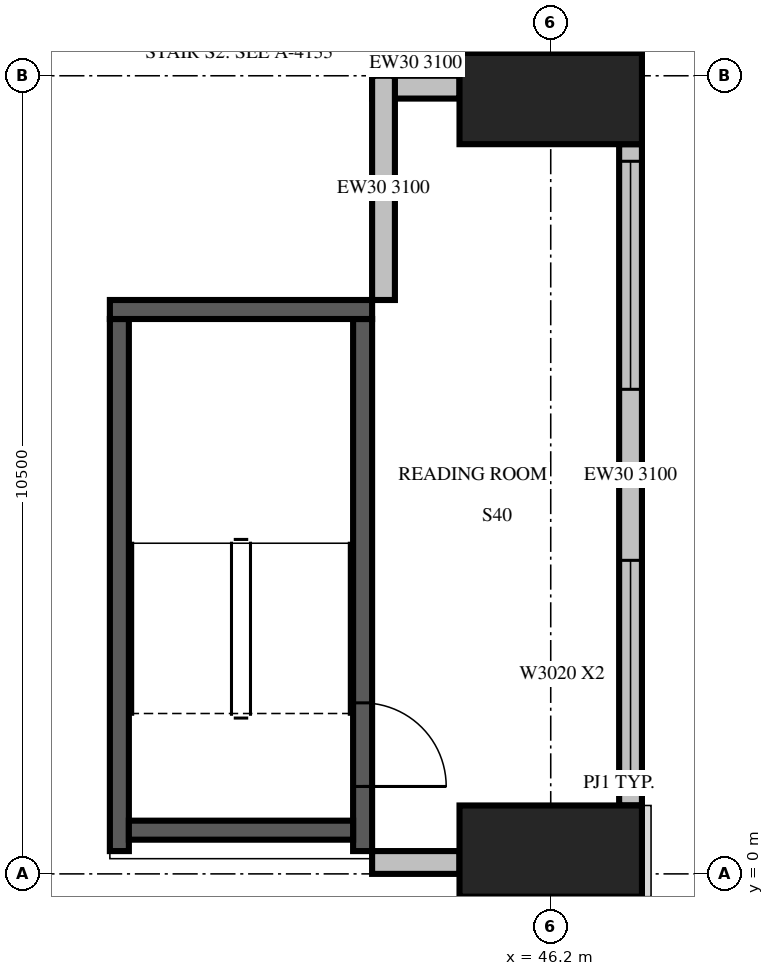
"""IFC4 building model, lengths in metres.
Left out: names, types, materials, properties, quantities, classifications, styles, units other than length and angle.
Written with IfcOpenShell. Run it as: python <this file> out.ifc"""

import sys

from ifc_helpers import new_model, si_unit, direction, frame, frame_2d, origin, origin_2d, place, context, subcontext, project, spatial, rectangle, extrude, source, transform, mapped, element, fill, save


model = new_model("IFC4")
c1 = context("Model", 3, precision=1e-05, world=origin(), true_north=direction((0.0, 1.0)))
c2 = subcontext(c1, "Body", "Model", "MODEL_VIEW")
j1 = project(units=[si_unit("LENGTHUNIT", "METRE"), si_unit("PLANEANGLEUNIT", "RADIAN")], contexts=[c1])
p1 = place(None, origin())
s1 = spatial("IfcSite", under=j1, at=p1, CompositionType="ELEMENT")
p2 = place(p1, origin())
s2 = spatial("IfcBuilding", under=s1, at=p2, CompositionType="ELEMENT")
p3 = place(p2, frame((0.0, 0.0, 337.0)))
s3 = spatial("IfcBuildingStorey", under=s2, at=p3, CompositionType="ELEMENT", Elevation=337.0)
m1 = source(origin(), c2, "Body", "SweptSolid", [
    extrude(rectangle(XDim=2.4, YDim=1.2, at=origin_2d()), origin(), (0.0, 0.0, 1.0), 3.5),
])
for number, where, z_axis, x_axis in (
    (1, (46.2, 0.3, 0.0), (0.0, 0.0, 1.0), (1.0, 0.0, 0.0)),
    (2, (46.2, 10.2, 0.0), (0.0, 0.0, 1.0), (1.0, 0.0, 0.0)),
):
    element("IfcColumn", number, at=place(p3, frame(where, z_axis=z_axis, x_axis=x_axis)), inside=s3, PredefinedType="PILASTER", context=c2, shape_type="MappedRepresentation", body=[
        mapped(m1, transform((0.0, 0.0, 0.0), scale=1.0)),
    ])
p4 = place(p3, frame((43.85, 0.15, 0.0), z_axis=(0.0, 0.0, 1.0), x_axis=(1.0, 0.0, 0.0)))
e3 = element("IfcWall", 3, at=p4, inside=s3, PredefinedType="STANDARD", context=c2, shape_type="SweptSolid", body=[
    extrude(rectangle(XDim=1.15, YDim=0.3, at=frame_2d((0.575, 0.0))), origin(), (0.0, 0.0, 1.0), 3.1),
])
m2 = source(origin(), c2, "Body", "SweptSolid", [
    extrude(rectangle(XDim=8.7, YDim=0.3, at=frame_2d((4.35, 0.0))), origin(), (0.0, 0.0, 1.0), 3.1),
])
p5 = place(p3, frame((47.25, 0.9, 0.0), z_axis=(0.0, 0.0, 1.0), x_axis=(0.0, 1.0, 0.0)))
e4 = element("IfcWall", 4, at=p5, inside=s3, PredefinedType="STANDARD", context=c2, shape_type="MappedRepresentation", body=[
    mapped(m2, transform((0.0, 0.0, 0.0), scale=1.0)),
])
m3 = source(origin(), c2, "Body", "SweptSolid", [
    extrude(rectangle(XDim=3.0, YDim=2.0, at=frame_2d((1.5, 1.0))), frame((0.0, 0.16, 0.0), z_axis=(0.0, -1.0, 0.0), x_axis=(1.0, 0.0, 0.0)), (0.0, 0.0, 1.0), 0.32),
])
p6 = place(p5, frame((0.225, 0.0, 0.6)))
e5 = element("IfcOpeningElement", 5, at=p6, cuts=e4, PredefinedType="OPENING", context=c2, shape_type="MappedRepresentation", body=[
    mapped(m3, transform((0.0, 0.0, 0.0), scale=1.0)),
])
p7 = place(p5, frame((5.475, 0.0, 0.6)))
e6 = element("IfcOpeningElement", 6, at=p7, cuts=e4, PredefinedType="OPENING", context=c2, shape_type="MappedRepresentation", body=[
    mapped(m3, transform((0.0, 0.0, 0.0), scale=1.0)),
])
m4 = source(origin(), c2, "Body", "SweptSolid", [
    extrude(rectangle(XDim=1.15, YDim=0.3, at=frame_2d((0.575, 0.0))), origin(), (0.0, 0.0, 1.0), 3.1),
])
p8 = place(p3, frame((45.0, 10.35, 0.0), z_axis=(0.0, 0.0, 1.0), x_axis=(-1.0, 0.0, 0.0)))
e7 = element("IfcWall", 7, at=p8, inside=s3, PredefinedType="STANDARD", context=c2, shape_type="MappedRepresentation", body=[
    mapped(m4, transform((0.0, 0.0, 0.0), scale=1.0)),
])
m5 = source(origin(), c2, "Body", "SweptSolid", [
    extrude(rectangle(XDim=2.95, YDim=0.3, at=frame_2d((1.475, 0.0))), origin(), (0.0, 0.0, 1.0), 3.1),
])
p9 = place(p3, frame((44.0, 10.5, 0.0), z_axis=(0.0, 0.0, 1.0), x_axis=(0.0, -1.0, 0.0)))
e8 = element("IfcWall", 8, at=p9, inside=s3, PredefinedType="STANDARD", context=c2, shape_type="MappedRepresentation", body=[
    mapped(m5, transform((0.0, 0.0, 0.0), scale=1.0)),
])
m6 = source(origin(), c2, "Body", "SweptSolid", [
    extrude(rectangle(XDim=7.0, YDim=0.25, at=frame_2d((3.5, 0.0))), origin(), (0.0, 0.0, 1.0), 3.1),
])
p10 = place(p3, frame((40.525, 0.3, 0.0), z_axis=(0.0, 0.0, 1.0), x_axis=(0.0, 1.0, 0.0)))
e9 = element("IfcWall", 9, at=p10, inside=s3, PredefinedType="SOLIDWALL", context=c2, shape_type="MappedRepresentation", body=[
    mapped(m6, transform((0.0, 0.0, 0.0), scale=1.0)),
])
p11 = place(p3, frame((43.725, 0.3, 0.0), z_axis=(0.0, 0.0, 1.0), x_axis=(0.0, 1.0, 0.0)))
e10 = element("IfcWall", 10, at=p11, inside=s3, PredefinedType="SOLIDWALL", context=c2, shape_type="MappedRepresentation", body=[
    mapped(m6, transform((0.0, 0.0, 0.0), scale=1.0)),
])
m7 = source(origin(), c2, "Body", "SweptSolid", [
    extrude(rectangle(XDim=1.1, YDim=2.1, at=frame_2d((0.55, 1.05))), frame((0.0, 0.135, 0.0), z_axis=(0.0, -1.0, 0.0), x_axis=(1.0, 0.0, 0.0)), (0.0, 0.0, 1.0), 0.27),
])
p12 = place(p11, frame((0.85, 0.0, 0.0)))
e11 = element("IfcOpeningElement", 11, at=p12, cuts=e10, PredefinedType="OPENING", context=c2, shape_type="MappedRepresentation", body=[
    mapped(m7, transform((0.0, 0.0, 0.0), scale=1.0)),
])
m8 = source(origin(), c2, "Body", "SweptSolid", [
    extrude(rectangle(XDim=3.45, YDim=0.25, at=frame_2d((1.725, 0.0))), origin(), (0.0, 0.0, 1.0), 3.1),
])
p13 = place(p3, frame((40.4, 7.425, 0.0), z_axis=(0.0, 0.0, 1.0), x_axis=(1.0, 0.0, 0.0)))
e12 = element("IfcWall", 12, at=p13, inside=s3, PredefinedType="SOLIDWALL", context=c2, shape_type="MappedRepresentation", body=[
    mapped(m8, transform((0.0, 0.0, 0.0), scale=1.0)),
])
m9 = source(origin(), c2, "Body", "SweptSolid", [
    extrude(rectangle(XDim=2.95, YDim=0.25, at=frame_2d((1.475, 0.0))), origin(), (0.0, 0.0, 1.0), 3.1),
])
p14 = place(p3, frame((40.65, 0.575, 0.0), z_axis=(0.0, 0.0, 1.0), x_axis=(1.0, 0.0, 0.0)))
e13 = element("IfcWall", 13, at=p14, inside=s3, PredefinedType="SOLIDWALL", context=c2, shape_type="MappedRepresentation", body=[
    mapped(m9, transform((0.0, 0.0, 0.0), scale=1.0)),
])
m10 = source(origin(), c2, "Body", "SweptSolid", [
    extrude(rectangle(XDim=3.0, YDim=2.0, at=frame_2d((1.5, 1.0))), frame((0.0, 0.03, 0.0), z_axis=(0.0, -1.0, 0.0), x_axis=(1.0, 0.0, 0.0)), (0.0, 0.0, 1.0), 0.06),
])
p15 = place(p6, origin())
e14 = element("IfcWindow", 14, at=p15, inside=s3, PartitioningType="SINGLE_PANEL", PredefinedType="WINDOW", context=c2, shape_type="MappedRepresentation", body=[
    mapped(m10, transform((0.0, 0.0, 0.0), scale=1.0)),
])
fill(e5, e14)
p16 = place(p7, origin())
e15 = element("IfcWindow", 15, at=p16, inside=s3, PartitioningType="SINGLE_PANEL", PredefinedType="WINDOW", context=c2, shape_type="MappedRepresentation", body=[
    mapped(m10, transform((0.0, 0.0, 0.0), scale=1.0)),
])
fill(e6, e15)
m11 = source(origin(), c2, "Body", "SweptSolid", [
    extrude(rectangle(XDim=1.1, YDim=2.1, at=frame_2d((0.55, 1.05))), frame((0.0, 0.025, 0.0), z_axis=(0.0, -1.0, 0.0), x_axis=(1.0, 0.0, 0.0)), (0.0, 0.0, 1.0), 0.05),
])
p17 = place(p12, origin())
e16 = element("IfcDoor", 16, at=p17, inside=s3, OperationType="SINGLE_SWING_RIGHT", PredefinedType="DOOR", context=c2, shape_type="MappedRepresentation", body=[
    mapped(m11, transform((0.0, 0.0, 0.0), scale=1.0)),
])
fill(e11, e16)
save(model, sys.argv[1])
